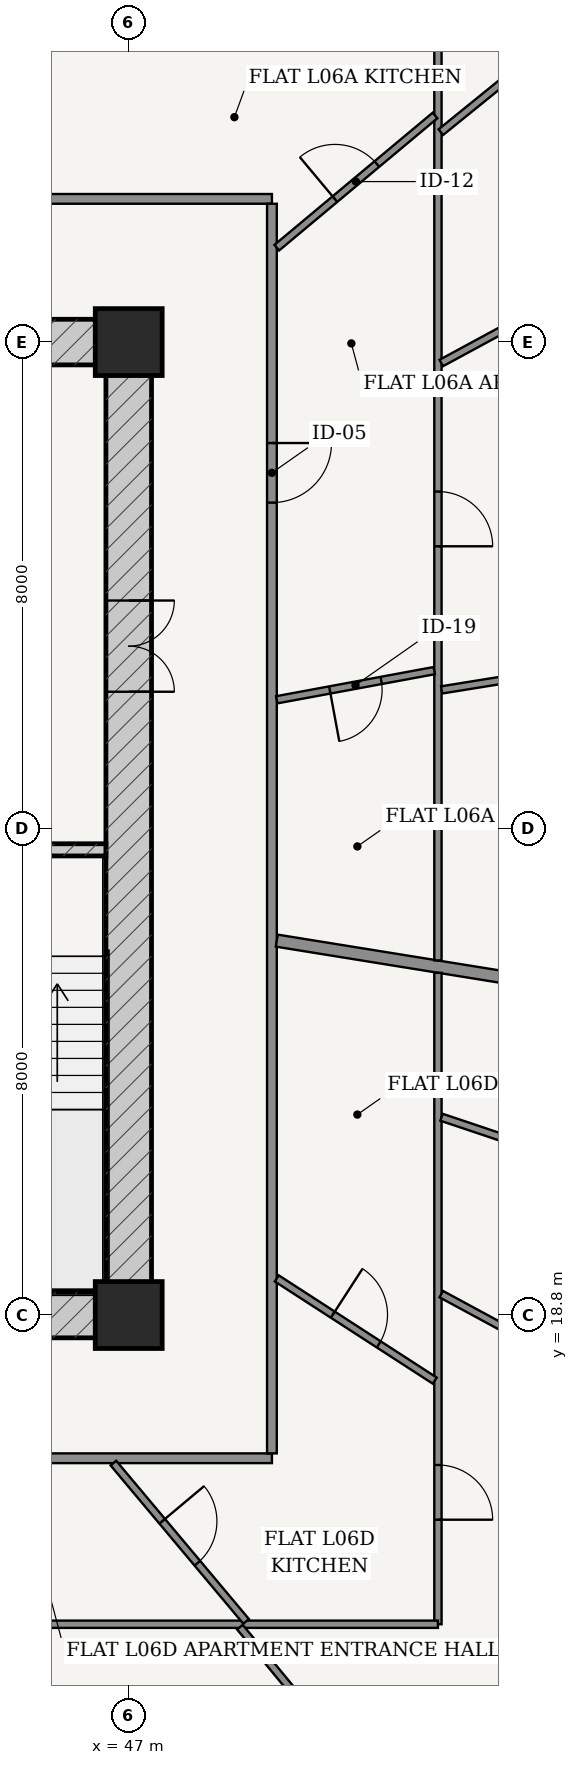
"""IFC4 building model, lengths in metres.
Left out: names, types, materials, properties, quantities, classifications, styles, units other than length and angle.
Written with IfcOpenShell. Run it as: python <this file> out.ifc"""

import sys

from ifc_helpers import new_model, si_unit, direction, frame, frame_2d, origin, origin_2d, place, context, subcontext, project, spatial, rectangle, extrude, source, transform, mapped, element, fill, save


model = new_model("IFC4")
c1 = context("Model", 3, precision=1e-05, world=origin(), true_north=direction((-0.2419218956, 0.970295726276)))
c2 = subcontext(c1, "Body", "Model", "MODEL_VIEW")
j1 = project(units=[si_unit("LENGTHUNIT", "METRE"), si_unit("PLANEANGLEUNIT", "RADIAN")], contexts=[c1])
p1 = place(None, origin())
s1 = spatial("IfcSite", under=j1, at=p1, CompositionType="ELEMENT")
p2 = place(p1, origin())
s2 = spatial("IfcBuilding", under=s1, at=p2, CompositionType="ELEMENT")
p3 = place(p2, frame((0.0, 0.0, 27.6)))
s3 = spatial("IfcBuildingStorey", under=s2, at=p3, CompositionType="ELEMENT", Elevation=27.6)
for number, where, z_axis, x_axis in (
    (1, (47.0, 18.8, 0.0), (0.0, 0.0, 1.0), (1.0, 0.0, 0.0)),
    (2, (47.0, 34.8, 0.0), (0.0, 0.0, 1.0), (1.0, 0.0, 0.0)),
):
    element("IfcColumn", number, at=place(p3, frame(where, z_axis=z_axis, x_axis=x_axis)), inside=s3, PredefinedType="COLUMN", context=c2, shape_type="SweptSolid", body=[
        extrude(rectangle(XDim=1.1, YDim=1.1, at=origin_2d()), origin(), (0.0, 0.0, 1.0), 3.6),
    ])
p4 = place(p3, frame((28.625, 18.8, 0.0), z_axis=(0.0, 0.0, 1.0), x_axis=(1.0, 0.0, 0.0)))
e3 = element("IfcWall", 3, at=p4, inside=s3, PredefinedType="SHEAR", context=c2, shape_type="SweptSolid", body=[
    extrude(rectangle(XDim=18.75, YDim=0.75, at=frame_2d((9.375, 0.0))), origin(), (0.0, 0.0, 1.0), 3.32),
])
p5 = place(p4, frame((8.95, 0.0, 0.0)))
e4 = element("IfcOpeningElement", 4, at=p5, cuts=e3, PredefinedType="OPENING", context=c2, shape_type="SweptSolid", body=[
    extrude(rectangle(XDim=0.85, YDim=2.1, at=frame_2d((0.425, 1.05))), frame((0.0, 0.385, 0.0), z_axis=(0.0, -1.0, 0.0), x_axis=(1.0, 0.0, 0.0)), (0.0, 0.0, 1.0), 0.77),
])
p6 = place(p3, frame((28.625, 34.8, 0.0), z_axis=(0.0, 0.0, 1.0), x_axis=(1.0, 0.0, 0.0)))
e5 = element("IfcWall", 5, at=p6, inside=s3, PredefinedType="SHEAR", context=c2, shape_type="SweptSolid", body=[
    extrude(rectangle(XDim=18.75, YDim=0.75, at=frame_2d((9.375, 0.0))), origin(), (0.0, 0.0, 1.0), 3.32),
])
p7 = place(p6, frame((8.95, 0.0, 0.0)))
e6 = element("IfcOpeningElement", 6, at=p7, cuts=e5, PredefinedType="OPENING", context=c2, shape_type="SweptSolid", body=[
    extrude(rectangle(XDim=0.85, YDim=2.1, at=frame_2d((0.425, 1.05))), frame((0.0, 0.385, 0.0), z_axis=(0.0, -1.0, 0.0), x_axis=(1.0, 0.0, 0.0)), (0.0, 0.0, 1.0), 0.77),
])
p8 = place(p3, frame((47.0, 19.175, 0.0), z_axis=(0.0, 0.0, 1.0), x_axis=(0.0, 1.0, 0.0)))
e7 = element("IfcWall", 7, at=p8, inside=s3, PredefinedType="SHEAR", context=c2, shape_type="SweptSolid", body=[
    extrude(rectangle(XDim=15.25, YDim=0.75, at=frame_2d((7.625, 0.0))), origin(), (0.0, 0.0, 1.0), 3.32),
])
p9 = place(p8, frame((9.875, 0.0, 0.0)))
e8 = element("IfcOpeningElement", 8, at=p9, cuts=e7, PredefinedType="OPENING", context=c2, shape_type="SweptSolid", body=[
    extrude(rectangle(XDim=1.5, YDim=2.2, at=frame_2d((0.75, 1.1))), frame((0.0, 0.385, 0.0), z_axis=(0.0, -1.0, 0.0), x_axis=(1.0, 0.0, 0.0)), (0.0, 0.0, 1.0), 0.77),
])
p10 = place(p3, frame((43.305, 26.45, 0.0), z_axis=(0.0, 0.0, 1.0), x_axis=(1.0, 0.0, 0.0)))
e9 = element("IfcWall", 9, at=p10, inside=s3, PredefinedType="SOLIDWALL", context=c2, shape_type="SweptSolid", body=[
    extrude(rectangle(XDim=3.32, YDim=0.2, at=frame_2d((1.66, 0.0))), origin(), (0.0, 0.0, 1.0), 3.32),
])
p11 = place(p10, frame((1.185, 0.0, 0.0)))
e10 = element("IfcOpeningElement", 10, at=p11, cuts=e9, PredefinedType="OPENING", context=c2, shape_type="SweptSolid", body=[
    extrude(rectangle(XDim=0.95, YDim=2.15, at=frame_2d((0.475, 1.075))), frame((0.0, 0.11, 0.0), z_axis=(0.0, -1.0, 0.0), x_axis=(1.0, 0.0, 0.0)), (0.0, 0.0, 1.0), 0.22),
])
p12 = place(p3, frame((26.645, 16.445, 0.0), z_axis=(0.0, 0.0, 1.0), x_axis=(1.0, 0.0, 0.0)))
e11 = element("IfcWall", 11, at=p12, inside=s3, PredefinedType="PARTITIONING", context=c2, shape_type="SweptSolid", body=[
    extrude(rectangle(XDim=22.71, YDim=0.16, at=frame_2d((11.355, 0.0))), origin(), (0.0, 0.0, 1.0), 2.688),
])
p13 = place(p12, frame((4.421, 0.0, 0.0)))
e12 = element("IfcOpeningElement", 12, at=p13, cuts=e11, PredefinedType="OPENING", context=c2, shape_type="SweptSolid", body=[
    extrude(rectangle(XDim=0.98, YDim=2.2, at=frame_2d((0.49, 1.1))), frame((0.0, 0.09, 0.0), z_axis=(0.0, -1.0, 0.0), x_axis=(1.0, 0.0, 0.0)), (0.0, 0.0, 1.0), 0.18),
])
p14 = place(p12, frame((16.153, 0.0, 0.0)))
e13 = element("IfcOpeningElement", 13, at=p14, cuts=e11, PredefinedType="OPENING", context=c2, shape_type="SweptSolid", body=[
    extrude(rectangle(XDim=0.98, YDim=2.2, at=frame_2d((0.49, 1.1))), frame((0.0, 0.09, 0.0), z_axis=(0.0, -1.0, 0.0), x_axis=(1.0, 0.0, 0.0)), (0.0, 0.0, 1.0), 0.18),
])
p15 = place(p3, frame((26.645, 37.155, 0.0), z_axis=(0.0, 0.0, 1.0), x_axis=(1.0, 0.0, 0.0)))
e14 = element("IfcWall", 14, at=p15, inside=s3, PredefinedType="PARTITIONING", context=c2, shape_type="SweptSolid", body=[
    extrude(rectangle(XDim=22.71, YDim=0.16, at=frame_2d((11.355, 0.0))), origin(), (0.0, 0.0, 1.0), 2.688),
])
p16 = place(p15, frame((7.446, 0.0, 0.0)))
e15 = element("IfcOpeningElement", 15, at=p16, cuts=e14, PredefinedType="OPENING", context=c2, shape_type="SweptSolid", body=[
    extrude(rectangle(XDim=0.98, YDim=2.2, at=frame_2d((0.49, 1.1))), frame((0.0, 0.09, 0.0), z_axis=(0.0, -1.0, 0.0), x_axis=(1.0, 0.0, 0.0)), (0.0, 0.0, 1.0), 0.18),
])
p17 = place(p3, frame((49.355, 16.525, 0.0), z_axis=(0.0, 0.0, 1.0), x_axis=(0.0, 1.0, 0.0)))
e16 = element("IfcWall", 16, at=p17, inside=s3, PredefinedType="PARTITIONING", context=c2, shape_type="SweptSolid", body=[
    extrude(rectangle(XDim=20.55, YDim=0.16, at=frame_2d((10.275, 0.0))), origin(), (0.0, 0.0, 1.0), 2.688),
])
p18 = place(p17, frame((15.635, 0.0, 0.0)))
e17 = element("IfcOpeningElement", 17, at=p18, cuts=e16, PredefinedType="OPENING", context=c2, shape_type="SweptSolid", body=[
    extrude(rectangle(XDim=0.98, YDim=2.2, at=frame_2d((0.49, 1.1))), frame((0.0, 0.09, 0.0), z_axis=(0.0, -1.0, 0.0), x_axis=(1.0, 0.0, 0.0)), (0.0, 0.0, 1.0), 0.18),
])
p19 = place(p3, frame((49.435, 24.957, 0.0), z_axis=(0.0, 0.0, 1.0), x_axis=(0.987258195973, -0.159126536076, 0.0)))
e18 = element("IfcWall", 18, at=p19, inside=s3, PredefinedType="PARTITIONING", context=c2, shape_type="SweptSolid", body=[
    extrude(rectangle(XDim=17.105, YDim=0.2, at=frame_2d((8.553, 0.0))), origin(), (0.0, 0.0, 1.0), 2.688),
])
p20 = place(p3, frame((52.085, 39.885, 0.0), z_axis=(0.0, 0.0, 1.0), x_axis=(0.0, -1.0, 0.0)))
e19 = element("IfcWall", 19, at=p20, inside=s3, PredefinedType="PARTITIONING", context=c2, shape_type="SweptSolid", body=[
    extrude(rectangle(XDim=15.253, YDim=0.12, at=frame_2d((7.627, 0.0))), origin(), (0.0, 0.0, 1.0), 2.688),
])
p21 = place(p20, frame((7.543, 0.0, 0.0)))
e20 = element("IfcOpeningElement", 20, at=p21, cuts=e19, PredefinedType="OPENING", context=c2, shape_type="SweptSolid", body=[
    extrude(rectangle(XDim=0.9, YDim=2.15, at=frame_2d((0.45, 1.075))), frame((0.0, 0.07, 0.0), z_axis=(0.0, -1.0, 0.0), x_axis=(1.0, 0.0, 0.0)), (0.0, 0.0, 1.0), 0.14),
])
p22 = place(p3, frame((52.146, 29.08, 0.0), z_axis=(0.0, 0.0, 1.0), x_axis=(0.987255773689, 0.159141563768, 0.0)))
e21 = element("IfcWall", 21, at=p22, inside=s3, PredefinedType="PARTITIONING", context=c2, shape_type="SweptSolid", body=[
    extrude(rectangle(XDim=14.359, YDim=0.12, at=frame_2d((7.18, 0.0))), origin(), (0.0, 0.0, 1.0), 2.688),
])
p23 = place(p22, frame((5.659, 0.0, 0.0)))
e22 = element("IfcOpeningElement", 22, at=p23, cuts=e21, PredefinedType="OPENING", context=c2, shape_type="SweptSolid", body=[
    extrude(rectangle(XDim=0.9, YDim=2.15, at=frame_2d((0.45, 1.075))), frame((0.0, 0.07, 0.0), z_axis=(0.0, -1.0, 0.0), x_axis=(1.0, 0.0, 0.0)), (0.0, 0.0, 1.0), 0.14),
])
p24 = place(p3, frame((52.139, 34.456, 0.0), z_axis=(0.0, 0.0, 1.0), x_axis=(0.879372452045, 0.476134529922, 0.0)))
e23 = element("IfcWall", 23, at=p24, inside=s3, PredefinedType="PARTITIONING", context=c2, shape_type="SweptSolid", body=[
    extrude(rectangle(XDim=11.219, YDim=0.12, at=frame_2d((5.61, 0.0))), origin(), (0.0, 0.0, 1.0), 2.688),
])
p25 = place(p24, frame((4.102, 0.0, 0.0)))
e24 = element("IfcOpeningElement", 24, at=p25, cuts=e23, PredefinedType="OPENING", context=c2, shape_type="SweptSolid", body=[
    extrude(rectangle(XDim=0.9, YDim=2.15, at=frame_2d((0.45, 1.075))), frame((0.0, 0.07, 0.0), z_axis=(0.0, -1.0, 0.0), x_axis=(1.0, 0.0, 0.0)), (0.0, 0.0, 1.0), 0.14),
])
p26 = place(p3, frame((52.133, 38.253, 0.0), z_axis=(0.0, 0.0, 1.0), x_axis=(0.776936623447, 0.629578814087, 0.0)))
e25 = element("IfcWall", 25, at=p26, inside=s3, PredefinedType="PARTITIONING", context=c2, shape_type="SweptSolid", body=[
    extrude(rectangle(XDim=8.136, YDim=0.12, at=frame_2d((4.068, 0.0))), origin(), (0.0, 0.0, 1.0), 2.762),
])
p27 = place(p26, frame((3.618, 0.0, 0.0)))
e26 = element("IfcOpeningElement", 26, at=p27, cuts=e25, PredefinedType="OPENING", context=c2, shape_type="SweptSolid", body=[
    extrude(rectangle(XDim=0.9, YDim=2.15, at=frame_2d((0.45, 1.075))), frame((0.0, 0.07, 0.0), z_axis=(0.0, -1.0, 0.0), x_axis=(1.0, 0.0, 0.0)), (0.0, 0.0, 1.0), 0.14),
])
p28 = place(p3, frame((49.435, 28.918, 0.0), z_axis=(0.0, 0.0, 1.0), x_axis=(0.983277085422, 0.182115823818, 0.0)))
e27 = element("IfcWall", 27, at=p28, inside=s3, PredefinedType="PARTITIONING", context=c2, shape_type="SweptSolid", body=[
    extrude(rectangle(XDim=2.633, YDim=0.12, at=frame_2d((1.316, 0.0))), origin(), (0.0, 0.0, 1.0), 3.32),
])
p29 = place(p28, frame((0.886, 0.0, 0.0)))
e28 = element("IfcOpeningElement", 28, at=p29, cuts=e27, PredefinedType="OPENING", context=c2, shape_type="SweptSolid", body=[
    extrude(rectangle(XDim=0.86, YDim=2.15, at=frame_2d((0.43, 1.075))), frame((0.0, 0.07, 0.0), z_axis=(0.0, -1.0, 0.0), x_axis=(1.0, 0.0, 0.0)), (0.0, 0.0, 1.0), 0.14),
])
p30 = place(p3, frame((49.435, 36.353, 0.0), z_axis=(0.0, 0.0, 1.0), x_axis=(0.76742398833, 0.641139939589, 0.0)))
e29 = element("IfcWall", 29, at=p30, inside=s3, PredefinedType="PARTITIONING", context=c2, shape_type="SweptSolid", body=[
    extrude(rectangle(XDim=3.391, YDim=0.12, at=frame_2d((1.695, 0.0))), origin(), (0.0, 0.0, 1.0), 2.999),
])
p31 = place(p30, frame((1.246, 0.0, 0.0)))
e30 = element("IfcOpeningElement", 30, at=p31, cuts=e29, PredefinedType="OPENING", context=c2, shape_type="SweptSolid", body=[
    extrude(rectangle(XDim=0.9, YDim=2.15, at=frame_2d((0.45, 1.075))), frame((0.0, 0.07, 0.0), z_axis=(0.0, -1.0, 0.0), x_axis=(1.0, 0.0, 0.0)), (0.0, 0.0, 1.0), 0.14),
])
p32 = place(p3, frame((43.335, 37.237, 0.0), z_axis=(0.0, 0.0, 1.0), x_axis=(0.455148959499, 0.890415310216, 0.0)))
e31 = element("IfcWall", 31, at=p32, inside=s3, PredefinedType="PARTITIONING", context=c2, shape_type="SweptSolid", body=[
    extrude(rectangle(XDim=12.598, YDim=0.2, at=frame_2d((6.299, 0.0))), origin(), (0.0, 0.0, 1.0), 2.762),
])
p33 = place(p3, frame((52.085, 24.428, 0.0), z_axis=(0.0, 0.0, 1.0), x_axis=(0.0, -1.0, 0.0)))
e32 = element("IfcWall", 32, at=p33, inside=s3, PredefinedType="PARTITIONING", context=c2, shape_type="SweptSolid", body=[
    extrude(rectangle(XDim=10.713, YDim=0.12, at=frame_2d((5.356, 0.0))), origin(), (0.0, 0.0, 1.0), 2.688),
])
p34 = place(p33, frame((8.094, 0.0, 0.0)))
e33 = element("IfcOpeningElement", 33, at=p34, cuts=e32, PredefinedType="OPENING", context=c2, shape_type="SweptSolid", body=[
    extrude(rectangle(XDim=0.9, YDim=2.15, at=frame_2d((0.45, 1.075))), frame((0.0, 0.07, 0.0), z_axis=(0.0, -1.0, 0.0), x_axis=(1.0, 0.0, 0.0)), (0.0, 0.0, 1.0), 0.14),
])
p35 = place(p3, frame((52.085, 13.715, 0.0), z_axis=(0.0, 0.0, 1.0), x_axis=(-1.0, 0.0, 0.0)))
e34 = element("IfcWall", 34, at=p35, inside=s3, PredefinedType="PARTITIONING", context=c2, shape_type="SweptSolid", body=[
    extrude(rectangle(XDim=17.195, YDim=0.12, at=frame_2d((8.597, 0.0))), origin(), (0.0, 0.0, 1.0), 2.688),
])
p36 = place(p35, frame((9.191, 0.0, 0.0)))
e35 = element("IfcOpeningElement", 35, at=p36, cuts=e34, PredefinedType="OPENING", context=c2, shape_type="SweptSolid", body=[
    extrude(rectangle(XDim=0.9, YDim=2.15, at=frame_2d((0.45, 1.075))), frame((0.0, 0.07, 0.0), z_axis=(0.0, -1.0, 0.0), x_axis=(1.0, 0.0, 0.0)), (0.0, 0.0, 1.0), 0.14),
])
p37 = place(p3, frame((44.717, 13.66, 0.0), z_axis=(0.0, 0.0, 1.0), x_axis=(0.455131303234, -0.890424335256, 0.0)))
e36 = element("IfcWall", 36, at=p37, inside=s3, PredefinedType="PARTITIONING", context=c2, shape_type="SweptSolid", body=[
    extrude(rectangle(XDim=9.562, YDim=0.12, at=frame_2d((4.781, 0.0))), origin(), (0.0, 0.0, 1.0), 2.762),
])
p38 = place(p37, frame((4.331, 0.0, 0.0)))
e37 = element("IfcOpeningElement", 37, at=p38, cuts=e36, PredefinedType="OPENING", context=c2, shape_type="SweptSolid", body=[
    extrude(rectangle(XDim=0.9, YDim=2.15, at=frame_2d((0.45, 1.075))), frame((0.0, 0.07, 0.0), z_axis=(0.0, -1.0, 0.0), x_axis=(1.0, 0.0, 0.0)), (0.0, 0.0, 1.0), 0.14),
])
p39 = place(p3, frame((48.829, 13.667, 0.0), z_axis=(0.0, 0.0, 1.0), x_axis=(0.636177533893, -0.771542704826, 0.0)))
e38 = element("IfcWall", 38, at=p39, inside=s3, PredefinedType="PARTITIONING", context=c2, shape_type="SweptSolid", body=[
    extrude(rectangle(XDim=8.187, YDim=0.12, at=frame_2d((4.093, 0.0))), origin(), (0.0, 0.0, 1.0), 2.688),
])
p40 = place(p3, frame((52.139, 19.144, 0.0), z_axis=(0.0, 0.0, 1.0), x_axis=(0.879372452045, -0.476134529922, 0.0)))
e39 = element("IfcWall", 39, at=p40, inside=s3, PredefinedType="PARTITIONING", context=c2, shape_type="SweptSolid", body=[
    extrude(rectangle(XDim=11.219, YDim=0.12, at=frame_2d((5.61, 0.0))), origin(), (0.0, 0.0, 1.0), 2.688),
])
p41 = place(p40, frame((4.097, 0.0, 0.0)))
e40 = element("IfcOpeningElement", 40, at=p41, cuts=e39, PredefinedType="OPENING", context=c2, shape_type="SweptSolid", body=[
    extrude(rectangle(XDim=0.9, YDim=2.15, at=frame_2d((0.45, 1.075))), frame((0.0, 0.07, 0.0), z_axis=(0.0, -1.0, 0.0), x_axis=(1.0, 0.0, 0.0)), (0.0, 0.0, 1.0), 0.14),
])
p42 = place(p3, frame((52.144, 22.052, 0.0), z_axis=(0.0, 0.0, 1.0), x_axis=(0.948023034133, -0.318201707653, 0.0)))
e41 = element("IfcWall", 41, at=p42, inside=s3, PredefinedType="PARTITIONING", context=c2, shape_type="SweptSolid", body=[
    extrude(rectangle(XDim=13.279, YDim=0.12, at=frame_2d((6.639, 0.0))), origin(), (0.0, 0.0, 1.0), 2.762),
])
p43 = place(p42, frame((6.189, 0.0, 0.0)))
e42 = element("IfcOpeningElement", 42, at=p43, cuts=e41, PredefinedType="OPENING", context=c2, shape_type="SweptSolid", body=[
    extrude(rectangle(XDim=0.9, YDim=2.15, at=frame_2d((0.45, 1.075))), frame((0.0, 0.07, 0.0), z_axis=(0.0, -1.0, 0.0), x_axis=(1.0, 0.0, 0.0)), (0.0, 0.0, 1.0), 0.14),
])
p44 = place(p3, frame((46.749, 16.365, 0.0), z_axis=(0.0, 0.0, 1.0), x_axis=(0.64245841772, -0.766320547487, 0.0)))
e43 = element("IfcWall", 43, at=p44, inside=s3, PredefinedType="PARTITIONING", context=c2, shape_type="SweptSolid", body=[
    extrude(rectangle(XDim=3.396, YDim=0.12, at=frame_2d((1.698, 0.0))), origin(), (0.0, 0.0, 1.0), 3.32),
])
p45 = place(p44, frame((1.248, 0.0, 0.0)))
e44 = element("IfcOpeningElement", 44, at=p45, cuts=e43, PredefinedType="OPENING", context=c2, shape_type="SweptSolid", body=[
    extrude(rectangle(XDim=0.9, YDim=2.15, at=frame_2d((0.45, 1.075))), frame((0.0, 0.07, 0.0), z_axis=(0.0, -1.0, 0.0), x_axis=(1.0, 0.0, 0.0)), (0.0, 0.0, 1.0), 0.14),
])
p46 = place(p3, frame((49.435, 19.402, 0.0), z_axis=(0.0, 0.0, 1.0), x_axis=(0.839582858019, -0.543231649042, 0.0)))
e45 = element("IfcWall", 45, at=p46, inside=s3, PredefinedType="PARTITIONING", context=c2, shape_type="SweptSolid", body=[
    extrude(rectangle(XDim=3.094, YDim=0.12, at=frame_2d((1.547, 0.0))), origin(), (0.0, 0.0, 1.0), 3.32),
])
p47 = place(p46, frame((1.097, 0.0, 0.0)))
e46 = element("IfcOpeningElement", 46, at=p47, cuts=e45, PredefinedType="OPENING", context=c2, shape_type="SweptSolid", body=[
    extrude(rectangle(XDim=0.9, YDim=2.15, at=frame_2d((0.45, 1.075))), frame((0.0, 0.07, 0.0), z_axis=(0.0, -1.0, 0.0), x_axis=(1.0, 0.0, 0.0)), (0.0, 0.0, 1.0), 0.14),
])
m1 = source(origin(), c2, "Body", "SweptSolid", [
    extrude(rectangle(XDim=1.5, YDim=2.2, at=frame_2d((0.75, 1.1))), frame((0.0, 0.025, 0.0), z_axis=(0.0, -1.0, 0.0), x_axis=(1.0, 0.0, 0.0)), (0.0, 0.0, 1.0), 0.05),
])
p48 = place(p9, frame((1.5, 0.0, 0.0), z_axis=(0.0, 0.0, 1.0), x_axis=(-1.0, 0.0, 0.0)))
e47 = element("IfcDoor", 47, at=p48, inside=s3, OperationType="DOUBLE_DOOR_SINGLE_SWING", PredefinedType="DOOR", context=c2, shape_type="MappedRepresentation", body=[
    mapped(m1, transform((0.0, 0.0, 0.0), scale=1.0)),
])
fill(e8, e47)
m2 = source(origin(), c2, "Body", "SweptSolid", [
    extrude(rectangle(XDim=0.98, YDim=2.2, at=frame_2d((0.49, 1.1))), frame((0.0, 0.025, 0.0), z_axis=(0.0, -1.0, 0.0), x_axis=(1.0, 0.0, 0.0)), (0.0, 0.0, 1.0), 0.05),
])
p49 = place(p18, frame((0.98, 0.0, 0.0), z_axis=(0.0, 0.0, 1.0), x_axis=(-1.0, 0.0, 0.0)))
e48 = element("IfcDoor", 48, at=p49, inside=s3, OperationType="SINGLE_SWING_LEFT", PredefinedType="DOOR", context=c2, shape_type="MappedRepresentation", body=[
    mapped(m2, transform((0.0, 0.0, 0.0), scale=1.0)),
])
fill(e17, e48)
m3 = source(origin(), c2, "Body", "SweptSolid", [
    extrude(rectangle(XDim=0.86, YDim=2.15, at=frame_2d((0.43, 1.075))), frame((0.0, 0.025, 0.0), z_axis=(0.0, -1.0, 0.0), x_axis=(1.0, 0.0, 0.0)), (0.0, 0.0, 1.0), 0.05),
])
p50 = place(p29, frame((0.86, 0.0, 0.0), z_axis=(0.0, 0.0, 1.0), x_axis=(-1.0, 0.0, 0.0)))
e49 = element("IfcDoor", 49, at=p50, inside=s3, OperationType="SINGLE_SWING_RIGHT", PredefinedType="DOOR", context=c2, shape_type="MappedRepresentation", body=[
    mapped(m3, transform((0.0, 0.0, 0.0), scale=1.0)),
])
fill(e28, e49)
m4 = source(origin(), c2, "Body", "SweptSolid", [
    extrude(rectangle(XDim=0.9, YDim=2.15, at=frame_2d((0.45, 1.075))), frame((0.0, 0.025, 0.0), z_axis=(0.0, -1.0, 0.0), x_axis=(1.0, 0.0, 0.0)), (0.0, 0.0, 1.0), 0.05),
])
p51 = place(p31, origin())
e50 = element("IfcDoor", 50, at=p51, inside=s3, OperationType="SINGLE_SWING_LEFT", PredefinedType="DOOR", context=c2, shape_type="MappedRepresentation", body=[
    mapped(m4, transform((0.0, 0.0, 0.0), scale=1.0)),
])
fill(e30, e50)
p52 = place(p21, origin())
e51 = element("IfcDoor", 51, at=p52, inside=s3, OperationType="SINGLE_SWING_RIGHT", PredefinedType="DOOR", context=c2, shape_type="MappedRepresentation", body=[
    mapped(m4, transform((0.0, 0.0, 0.0), scale=1.0)),
])
fill(e20, e51)
p53 = place(p45, origin())
e52 = element("IfcDoor", 52, at=p53, inside=s3, OperationType="SINGLE_SWING_LEFT", PredefinedType="DOOR", context=c2, shape_type="MappedRepresentation", body=[
    mapped(m4, transform((0.0, 0.0, 0.0), scale=1.0)),
])
fill(e44, e52)
p54 = place(p34, origin())
e53 = element("IfcDoor", 53, at=p54, inside=s3, OperationType="SINGLE_SWING_RIGHT", PredefinedType="DOOR", context=c2, shape_type="MappedRepresentation", body=[
    mapped(m4, transform((0.0, 0.0, 0.0), scale=1.0)),
])
fill(e33, e53)
p55 = place(p47, origin())
e54 = element("IfcDoor", 54, at=p55, inside=s3, OperationType="SINGLE_SWING_LEFT", PredefinedType="DOOR", context=c2, shape_type="MappedRepresentation", body=[
    mapped(m4, transform((0.0, 0.0, 0.0), scale=1.0)),
])
fill(e46, e54)
save(model, sys.argv[1])
